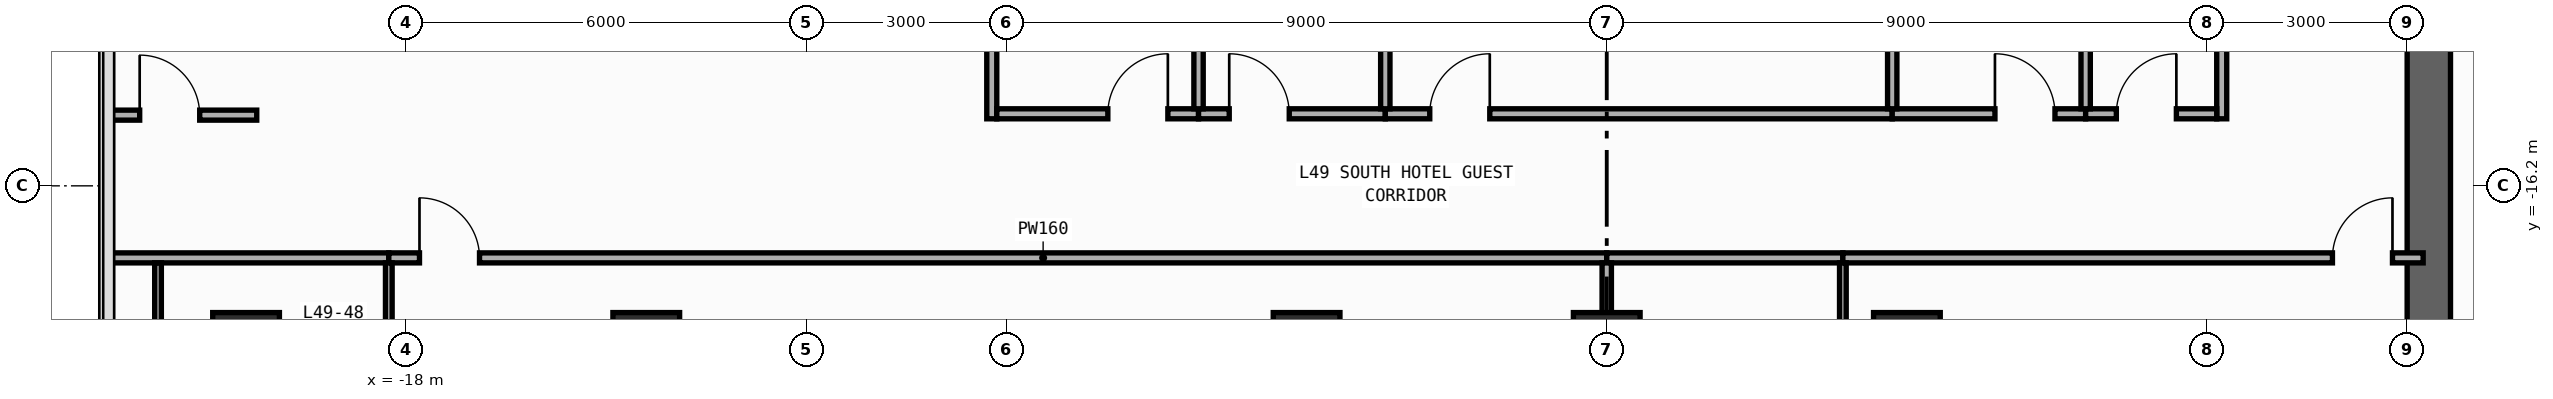
"""IFC4 building model, lengths in metres.
Left out: names, types, materials, properties, quantities, classifications, styles, units other than length and angle.
Written with IfcOpenShell. Run it as: python <this file> out.ifc"""

import sys

from ifc_helpers import new_model, si_unit, direction, frame, frame_2d, origin, origin_2d, place, context, subcontext, project, spatial, rectangle, extrude, element, fill, save


model = new_model("IFC4")
c1 = context("Model", 3, precision=1e-05, world=origin(), true_north=direction((0.0, 1.0)))
c2 = subcontext(c1, "Body", "Model", "MODEL_VIEW")
j1 = project(units=[si_unit("LENGTHUNIT", "METRE"), si_unit("PLANEANGLEUNIT", "RADIAN")], contexts=[c1])
p1 = place(None, origin())
s1 = spatial("IfcSite", under=j1, at=p1, CompositionType="ELEMENT")
p2 = place(p1, origin())
s2 = spatial("IfcBuilding", under=s1, at=p2, CompositionType="ELEMENT")
p3 = place(p2, frame((0.0, 0.0, 210.6)))
s3 = spatial("IfcBuildingStorey", under=s2, at=p3, CompositionType="ELEMENT", Elevation=210.6)
p4 = place(p3, frame((12.325, -19.8, 0.0), z_axis=(0.0, 0.0, 1.0), x_axis=(0.0, 1.0, 0.0)))
e1 = element("IfcWall", 1, at=p4, inside=s3, PredefinedType="SHEAR", context=c2, shape_type="SweptSolid", body=[
    extrude(rectangle(XDim=27.0, YDim=0.65, at=frame_2d((13.5, 0.0))), origin(), (0.0, 0.0, 1.0), 3.45),
])
p5 = place(p4, frame((23.05, 0.0, 0.0)))
e2 = element("IfcOpeningElement", 2, at=p5, cuts=e1, PredefinedType="OPENING", context=c2, shape_type="SweptSolid", body=[
    extrude(rectangle(XDim=1.1, YDim=2.2, at=frame_2d((0.55, 1.1))), frame((0.0, 0.335, 0.0), z_axis=(0.0, -1.0, 0.0), x_axis=(1.0, 0.0, 0.0)), (0.0, 0.0, 1.0), 0.67),
])
p6 = place(p4, frame((19.85, 0.0, 0.0)))
e3 = element("IfcOpeningElement", 3, at=p6, cuts=e1, PredefinedType="OPENING", context=c2, shape_type="SweptSolid", body=[
    extrude(rectangle(XDim=1.1, YDim=2.2, at=frame_2d((0.55, 1.1))), frame((0.0, 0.335, 0.0), z_axis=(0.0, -1.0, 0.0), x_axis=(1.0, 0.0, 0.0)), (0.0, 0.0, 1.0), 0.67),
])
p7 = place(p4, frame((16.65, 0.0, 0.0)))
e4 = element("IfcOpeningElement", 4, at=p7, cuts=e1, PredefinedType="OPENING", context=c2, shape_type="SweptSolid", body=[
    extrude(rectangle(XDim=1.1, YDim=2.2, at=frame_2d((0.55, 1.1))), frame((0.0, 0.335, 0.0), z_axis=(0.0, -1.0, 0.0), x_axis=(1.0, 0.0, 0.0)), (0.0, 0.0, 1.0), 0.67),
])
p8 = place(p4, frame((10.175, 0.0, 0.0)))
e5 = element("IfcOpeningElement", 5, at=p8, cuts=e1, PredefinedType="OPENING", context=c2, shape_type="SweptSolid", body=[
    extrude(rectangle(XDim=0.85, YDim=2.1, at=frame_2d((0.425, 1.05))), frame((0.0, 0.335, 0.0), z_axis=(0.0, -1.0, 0.0), x_axis=(1.0, 0.0, 0.0)), (0.0, 0.0, 1.0), 0.67),
])
p9 = place(p4, frame((12.725, 0.0, 0.0)))
e6 = element("IfcOpeningElement", 6, at=p9, cuts=e1, PredefinedType="OPENING", context=c2, shape_type="SweptSolid", body=[
    extrude(rectangle(XDim=1.15, YDim=2.2, at=frame_2d((0.575, 1.1))), frame((0.0, 0.335, 0.0), z_axis=(0.0, -1.0, 0.0), x_axis=(1.0, 0.0, 0.0)), (0.0, 0.0, 1.0), 0.67),
])
p10 = place(p4, frame((25.125, 0.0, 0.0)))
e7 = element("IfcOpeningElement", 7, at=p10, cuts=e1, PredefinedType="OPENING", context=c2, shape_type="SweptSolid", body=[
    extrude(rectangle(XDim=0.85, YDim=2.1, at=frame_2d((0.425, 1.05))), frame((0.0, 0.335, 0.0), z_axis=(0.0, -1.0, 0.0), x_axis=(1.0, 0.0, 0.0)), (0.0, 0.0, 1.0), 0.67),
])
for number, where, z_axis, x_axis in (
    (8, (-20.4, -18.6, 0.0), (0.0, 0.0, 1.0), (1.0, 0.0, 0.0)),
    (9, (-14.4, -18.6, 0.0), (0.0, 0.0, 1.0), (1.0, 0.0, 0.0)),
    (10, (-4.5, -18.6, 0.0), (0.0, 0.0, 1.0), (1.0, 0.0, 0.0)),
    (11, (0.0, -18.6, 0.0), (0.0, 0.0, 1.0), (1.0, 0.0, 0.0)),
    (12, (4.5, -18.6, 0.0), (0.0, 0.0, 1.0), (1.0, 0.0, 0.0)),
):
    element("IfcColumn", number, at=place(p3, frame(where, z_axis=z_axis, x_axis=x_axis)), inside=s3, PredefinedType="COLUMN", context=c2, shape_type="SweptSolid", body=[
        extrude(rectangle(XDim=1.0, YDim=1.0, at=origin_2d()), origin(), (0.0, 0.0, 1.0), 3.8),
    ])
p11 = place(p3, frame((-9.22, -15.195, 0.0), z_axis=(0.0, 0.0, 1.0), x_axis=(0.0, 1.0, 0.0)))
e13 = element("IfcWall", 13, at=p11, inside=s3, PredefinedType="PARTITIONING", context=c2, shape_type="SweptSolid", body=[
    extrude(rectangle(XDim=19.395, YDim=0.15, at=frame_2d((9.698, 0.0))), origin(), (0.0, 0.0, 1.0), 2.862),
])
p12 = place(p11, frame((9.348, 0.0, 0.0)))
e14 = element("IfcOpeningElement", 14, at=p12, cuts=e13, PredefinedType="OPENING", context=c2, shape_type="SweptSolid", body=[
    extrude(rectangle(XDim=0.9, YDim=2.15, at=frame_2d((0.45, 1.075))), frame((0.0, 0.085, 0.0), z_axis=(0.0, -1.0, 0.0), x_axis=(1.0, 0.0, 0.0)), (0.0, 0.0, 1.0), 0.17),
])
p13 = place(p3, frame((9.22, -15.195, 0.0), z_axis=(0.0, 0.0, 1.0), x_axis=(0.0, 1.0, 0.0)))
e15 = element("IfcWall", 15, at=p13, inside=s3, PredefinedType="PARTITIONING", context=c2, shape_type="SweptSolid", body=[
    extrude(rectangle(XDim=19.395, YDim=0.15, at=frame_2d((9.698, 0.0))), origin(), (0.0, 0.0, 1.0), 2.862),
])
p14 = place(p13, frame((9.348, 0.0, 0.0)))
e16 = element("IfcOpeningElement", 16, at=p14, cuts=e15, PredefinedType="OPENING", context=c2, shape_type="SweptSolid", body=[
    extrude(rectangle(XDim=0.9, YDim=2.15, at=frame_2d((0.45, 1.075))), frame((0.0, 0.085, 0.0), z_axis=(0.0, -1.0, 0.0), x_axis=(1.0, 0.0, 0.0)), (0.0, 0.0, 1.0), 0.17),
])
p15 = place(p3, frame((-9.145, -15.12, 0.0), z_axis=(0.0, 0.0, 1.0), x_axis=(1.0, 0.0, 0.0)))
e17 = element("IfcWall", 17, at=p15, inside=s3, PredefinedType="PARTITIONING", context=c2, shape_type="SweptSolid", body=[
    extrude(rectangle(XDim=3.025, YDim=0.15, at=frame_2d((1.512, 0.0))), origin(), (0.0, 0.0, 1.0), 3.45),
])
p16 = place(p15, frame((1.665, 0.0, 0.0)))
e18 = element("IfcOpeningElement", 18, at=p16, cuts=e17, PredefinedType="OPENING", context=c2, shape_type="SweptSolid", body=[
    extrude(rectangle(XDim=0.9, YDim=2.15, at=frame_2d((0.45, 1.075))), frame((0.0, 0.085, 0.0), z_axis=(0.0, -1.0, 0.0), x_axis=(1.0, 0.0, 0.0)), (0.0, 0.0, 1.0), 0.17),
])
p17 = place(p3, frame((-6.12, -15.12, 0.0), z_axis=(0.0, 0.0, 1.0), x_axis=(1.0, 0.0, 0.0)))
e19 = element("IfcWall", 19, at=p17, inside=s3, PredefinedType="PARTITIONING", context=c2, shape_type="SweptSolid", body=[
    extrude(rectangle(XDim=2.8, YDim=0.15, at=frame_2d((1.4, 0.0))), origin(), (0.0, 0.0, 1.0), 3.45),
])
p18 = place(p17, frame((0.46, 0.0, 0.0)))
e20 = element("IfcOpeningElement", 20, at=p18, cuts=e19, PredefinedType="OPENING", context=c2, shape_type="SweptSolid", body=[
    extrude(rectangle(XDim=0.9, YDim=2.15, at=frame_2d((0.45, 1.075))), frame((0.0, 0.085, 0.0), z_axis=(0.0, -1.0, 0.0), x_axis=(1.0, 0.0, 0.0)), (0.0, 0.0, 1.0), 0.17),
])
p19 = place(p3, frame((-3.32, -15.12, 0.0), z_axis=(0.0, 0.0, 1.0), x_axis=(1.0, 0.0, 0.0)))
e21 = element("IfcWall", 21, at=p19, inside=s3, PredefinedType="PARTITIONING", context=c2, shape_type="SweptSolid", body=[
    extrude(rectangle(XDim=7.6, YDim=0.15, at=frame_2d((3.8, 0.0))), origin(), (0.0, 0.0, 1.0), 3.45),
])
p20 = place(p19, frame((0.667, 0.0, 0.0)))
e22 = element("IfcOpeningElement", 22, at=p20, cuts=e21, PredefinedType="OPENING", context=c2, shape_type="SweptSolid", body=[
    extrude(rectangle(XDim=0.9, YDim=2.15, at=frame_2d((0.45, 1.075))), frame((0.0, 0.085, 0.0), z_axis=(0.0, -1.0, 0.0), x_axis=(1.0, 0.0, 0.0)), (0.0, 0.0, 1.0), 0.17),
])
p21 = place(p3, frame((4.28, -15.12, 0.0), z_axis=(0.0, 0.0, 1.0), x_axis=(1.0, 0.0, 0.0)))
e23 = element("IfcWall", 23, at=p21, inside=s3, PredefinedType="PARTITIONING", context=c2, shape_type="SweptSolid", body=[
    extrude(rectangle(XDim=2.9, YDim=0.15, at=frame_2d((1.45, 0.0))), origin(), (0.0, 0.0, 1.0), 3.45),
])
p22 = place(p21, frame((1.54, 0.0, 0.0)))
e24 = element("IfcOpeningElement", 24, at=p22, cuts=e23, PredefinedType="OPENING", context=c2, shape_type="SweptSolid", body=[
    extrude(rectangle(XDim=0.9, YDim=2.15, at=frame_2d((0.45, 1.075))), frame((0.0, 0.085, 0.0), z_axis=(0.0, -1.0, 0.0), x_axis=(1.0, 0.0, 0.0)), (0.0, 0.0, 1.0), 0.17),
])
p23 = place(p3, frame((7.18, -15.12, 0.0), z_axis=(0.0, 0.0, 1.0), x_axis=(1.0, 0.0, 0.0)))
e25 = element("IfcWall", 25, at=p23, inside=s3, PredefinedType="PARTITIONING", context=c2, shape_type="SweptSolid", body=[
    extrude(rectangle(XDim=1.965, YDim=0.15, at=frame_2d((0.982, 0.0))), origin(), (0.0, 0.0, 1.0), 3.45),
])
p24 = place(p23, frame((0.46, 0.0, 0.0)))
e26 = element("IfcOpeningElement", 26, at=p24, cuts=e25, PredefinedType="OPENING", context=c2, shape_type="SweptSolid", body=[
    extrude(rectangle(XDim=0.9, YDim=2.15, at=frame_2d((0.45, 1.075))), frame((0.0, 0.085, 0.0), z_axis=(0.0, -1.0, 0.0), x_axis=(1.0, 0.0, 0.0)), (0.0, 0.0, 1.0), 0.17),
])
p25 = place(p3, frame((-22.455, -17.28, 0.0), z_axis=(0.0, 0.0, 1.0), x_axis=(1.0, 0.0, 0.0)))
e27 = element("IfcWall", 27, at=p25, inside=s3, PredefinedType="PARTITIONING", context=c2, shape_type="SweptSolid", body=[
    extrude(rectangle(XDim=4.195, YDim=0.15, at=frame_2d((2.098, 0.0))), origin(), (0.0, 0.0, 1.0), 3.45),
])
p26 = place(p3, frame((-18.26, -17.28, 0.0), z_axis=(0.0, 0.0, 1.0), x_axis=(1.0, 0.0, 0.0)))
e28 = element("IfcWall", 28, at=p26, inside=s3, PredefinedType="PARTITIONING", context=c2, shape_type="SweptSolid", body=[
    extrude(rectangle(XDim=18.26, YDim=0.15, at=frame_2d((9.13, 0.0))), origin(), (0.0, 0.0, 1.0), 3.45),
])
p27 = place(p26, frame((0.46, 0.0, 0.0)))
e29 = element("IfcOpeningElement", 29, at=p27, cuts=e28, PredefinedType="OPENING", context=c2, shape_type="SweptSolid", body=[
    extrude(rectangle(XDim=0.9, YDim=2.15, at=frame_2d((0.45, 1.075))), frame((0.0, 0.085, 0.0), z_axis=(0.0, -1.0, 0.0), x_axis=(1.0, 0.0, 0.0)), (0.0, 0.0, 1.0), 0.17),
])
p28 = place(p3, frame((0.0, -17.28, 0.0), z_axis=(0.0, 0.0, 1.0), x_axis=(1.0, 0.0, 0.0)))
e30 = element("IfcWall", 30, at=p28, inside=s3, PredefinedType="PARTITIONING", context=c2, shape_type="SweptSolid", body=[
    extrude(rectangle(XDim=3.54, YDim=0.15, at=frame_2d((1.77, 0.0))), origin(), (0.0, 0.0, 1.0), 3.45),
])
p29 = place(p3, frame((3.54, -17.28, 0.0), z_axis=(0.0, 0.0, 1.0), x_axis=(1.0, 0.0, 0.0)))
e31 = element("IfcWall", 31, at=p29, inside=s3, PredefinedType="PARTITIONING", context=c2, shape_type="SweptSolid", body=[
    extrude(rectangle(XDim=8.7, YDim=0.15, at=frame_2d((4.35, 0.0))), origin(), (0.0, 0.0, 1.0), 3.45),
])
p30 = place(p29, frame((7.34, 0.0, 0.0)))
e32 = element("IfcOpeningElement", 32, at=p30, cuts=e31, PredefinedType="OPENING", context=c2, shape_type="SweptSolid", body=[
    extrude(rectangle(XDim=0.9, YDim=2.15, at=frame_2d((0.45, 1.075))), frame((0.0, 0.085, 0.0), z_axis=(0.0, -1.0, 0.0), x_axis=(1.0, 0.0, 0.0)), (0.0, 0.0, 1.0), 0.17),
])
p31 = place(p3, frame((-22.455, -15.14, 0.0), z_axis=(0.0, 0.0, 1.0), x_axis=(1.0, 0.0, 0.0)))
e33 = element("IfcWall", 33, at=p31, inside=s3, PredefinedType="PARTITIONING", context=c2, shape_type="SweptSolid", body=[
    extrude(rectangle(XDim=2.215, YDim=0.15, at=frame_2d((1.107, 0.0))), origin(), (0.0, 0.0, 1.0), 3.45),
])
p32 = place(p31, frame((0.46, 0.0, 0.0)))
e34 = element("IfcOpeningElement", 34, at=p32, cuts=e33, PredefinedType="OPENING", context=c2, shape_type="SweptSolid", body=[
    extrude(rectangle(XDim=0.9, YDim=2.15, at=frame_2d((0.45, 1.075))), frame((0.0, 0.085, 0.0), z_axis=(0.0, -1.0, 0.0), x_axis=(1.0, 0.0, 0.0)), (0.0, 0.0, 1.0), 0.17),
])
for number, where, z_axis, x_axis in (
    (35, (-6.12, -15.045, 0.0), (0.0, 0.0, 1.0), (0.0, 1.0, 0.0)),
    (36, (-3.32, -15.045, 0.0), (0.0, 0.0, 1.0), (0.0, 1.0, 0.0)),
):
    element("IfcWall", number, at=place(p3, frame(where, z_axis=z_axis, x_axis=x_axis)), inside=s3, PredefinedType="PARTITIONING", context=c2, shape_type="SweptSolid", body=[
        extrude(rectangle(XDim=19.175, YDim=0.14, at=frame_2d((9.587, 0.0))), origin(), (0.0, 0.0, 1.0), 3.45),
    ])
for number, where, z_axis, x_axis in (
    (37, (4.28, -15.045, 0.0), (0.0, 0.0, 1.0), (0.0, 1.0, 0.0)),
    (38, (7.18, -15.045, 0.0), (0.0, 0.0, 1.0), (0.0, 1.0, 0.0)),
):
    element("IfcWall", number, at=place(p3, frame(where, z_axis=z_axis, x_axis=x_axis)), inside=s3, PredefinedType="PARTITIONING", context=c2, shape_type="SweptSolid", body=[
        extrude(rectangle(XDim=2.885, YDim=0.14, at=frame_2d((1.442, 0.0))), origin(), (0.0, 0.0, 1.0), 3.45),
    ])
p33 = place(p3, frame((-18.26, -20.32, 0.0), z_axis=(0.0, 0.0, 1.0), x_axis=(0.0, 1.0, 0.0)))
e39 = element("IfcWall", 39, at=p33, inside=s3, PredefinedType="PARTITIONING", context=c2, shape_type="SweptSolid", body=[
    extrude(rectangle(XDim=2.965, YDim=0.1, at=frame_2d((1.482, 0.0))), origin(), (0.0, 0.0, 1.0), 3.45),
])
p34 = place(p33, frame((0.46, 0.0, 0.0)))
e40 = element("IfcOpeningElement", 40, at=p34, cuts=e39, PredefinedType="OPENING", context=c2, shape_type="SweptSolid", body=[
    extrude(rectangle(XDim=0.8, YDim=2.1, at=frame_2d((0.4, 1.05))), frame((0.0, 0.06, 0.0), z_axis=(0.0, -1.0, 0.0), x_axis=(1.0, 0.0, 0.0)), (0.0, 0.0, 1.0), 0.12),
])
p35 = place(p3, frame((0.0, -20.37, 0.0), z_axis=(0.0, 0.0, 1.0), x_axis=(0.0, 1.0, 0.0)))
e41 = element("IfcWall", 41, at=p35, inside=s3, PredefinedType="PARTITIONING", context=c2, shape_type="SweptSolid", body=[
    extrude(rectangle(XDim=3.015, YDim=0.14, at=frame_2d((1.508, 0.0))), origin(), (0.0, 0.0, 1.0), 3.45),
])
for number, where, z_axis, x_axis in (
    (42, (3.54, -20.32, 0.0), (0.0, 0.0, 1.0), (0.0, 1.0, 0.0)),
    (43, (-21.72, -20.32, 0.0), (0.0, 0.0, 1.0), (0.0, 1.0, 0.0)),
):
    element("IfcWall", number, at=place(p3, frame(where, z_axis=z_axis, x_axis=x_axis)), inside=s3, PredefinedType="PARTITIONING", context=c2, shape_type="SweptSolid", body=[
        extrude(rectangle(XDim=2.965, YDim=0.1, at=frame_2d((1.482, 0.0))), origin(), (0.0, 0.0, 1.0), 3.45),
    ])
p36 = place(p16, origin())
e44 = element("IfcDoor", 44, at=p36, inside=s3, OperationType="SINGLE_SWING_RIGHT", PredefinedType="DOOR", context=c2, shape_type="SweptSolid", body=[
    extrude(rectangle(XDim=0.9, YDim=2.15, at=frame_2d((0.45, 1.075))), frame((0.0, 0.025, 0.0), z_axis=(0.0, -1.0, 0.0), x_axis=(1.0, 0.0, 0.0)), (0.0, 0.0, 1.0), 0.05),
])
fill(e18, e44)
p37 = place(p18, origin())
e45 = element("IfcDoor", 45, at=p37, inside=s3, OperationType="SINGLE_SWING_LEFT", PredefinedType="DOOR", context=c2, shape_type="SweptSolid", body=[
    extrude(rectangle(XDim=0.9, YDim=2.15, at=frame_2d((0.45, 1.075))), frame((0.0, 0.025, 0.0), z_axis=(0.0, -1.0, 0.0), x_axis=(1.0, 0.0, 0.0)), (0.0, 0.0, 1.0), 0.05),
])
fill(e20, e45)
p38 = place(p20, origin())
e46 = element("IfcDoor", 46, at=p38, inside=s3, OperationType="SINGLE_SWING_RIGHT", PredefinedType="DOOR", context=c2, shape_type="SweptSolid", body=[
    extrude(rectangle(XDim=0.9, YDim=2.15, at=frame_2d((0.45, 1.075))), frame((0.0, 0.025, 0.0), z_axis=(0.0, -1.0, 0.0), x_axis=(1.0, 0.0, 0.0)), (0.0, 0.0, 1.0), 0.05),
])
fill(e22, e46)
p39 = place(p22, origin())
e47 = element("IfcDoor", 47, at=p39, inside=s3, OperationType="SINGLE_SWING_LEFT", PredefinedType="DOOR", context=c2, shape_type="SweptSolid", body=[
    extrude(rectangle(XDim=0.9, YDim=2.15, at=frame_2d((0.45, 1.075))), frame((0.0, 0.025, 0.0), z_axis=(0.0, -1.0, 0.0), x_axis=(1.0, 0.0, 0.0)), (0.0, 0.0, 1.0), 0.05),
])
fill(e24, e47)
p40 = place(p24, origin())
e48 = element("IfcDoor", 48, at=p40, inside=s3, OperationType="SINGLE_SWING_RIGHT", PredefinedType="DOOR", context=c2, shape_type="SweptSolid", body=[
    extrude(rectangle(XDim=0.9, YDim=2.15, at=frame_2d((0.45, 1.075))), frame((0.0, 0.025, 0.0), z_axis=(0.0, -1.0, 0.0), x_axis=(1.0, 0.0, 0.0)), (0.0, 0.0, 1.0), 0.05),
])
fill(e26, e48)
p41 = place(p27, origin())
e49 = element("IfcDoor", 49, at=p41, inside=s3, OperationType="SINGLE_SWING_LEFT", PredefinedType="DOOR", context=c2, shape_type="SweptSolid", body=[
    extrude(rectangle(XDim=0.9, YDim=2.15, at=frame_2d((0.45, 1.075))), frame((0.0, 0.025, 0.0), z_axis=(0.0, -1.0, 0.0), x_axis=(1.0, 0.0, 0.0)), (0.0, 0.0, 1.0), 0.05),
])
fill(e29, e49)
p42 = place(p30, origin())
e50 = element("IfcDoor", 50, at=p42, inside=s3, OperationType="SINGLE_SWING_RIGHT", PredefinedType="DOOR", context=c2, shape_type="SweptSolid", body=[
    extrude(rectangle(XDim=0.9, YDim=2.15, at=frame_2d((0.45, 1.075))), frame((0.0, 0.025, 0.0), z_axis=(0.0, -1.0, 0.0), x_axis=(1.0, 0.0, 0.0)), (0.0, 0.0, 1.0), 0.05),
])
fill(e32, e50)
p43 = place(p32, origin())
e51 = element("IfcDoor", 51, at=p43, inside=s3, OperationType="SINGLE_SWING_LEFT", PredefinedType="DOOR", context=c2, shape_type="SweptSolid", body=[
    extrude(rectangle(XDim=0.9, YDim=2.15, at=frame_2d((0.45, 1.075))), frame((0.0, 0.025, 0.0), z_axis=(0.0, -1.0, 0.0), x_axis=(1.0, 0.0, 0.0)), (0.0, 0.0, 1.0), 0.05),
])
fill(e34, e51)
save(model, sys.argv[1])
